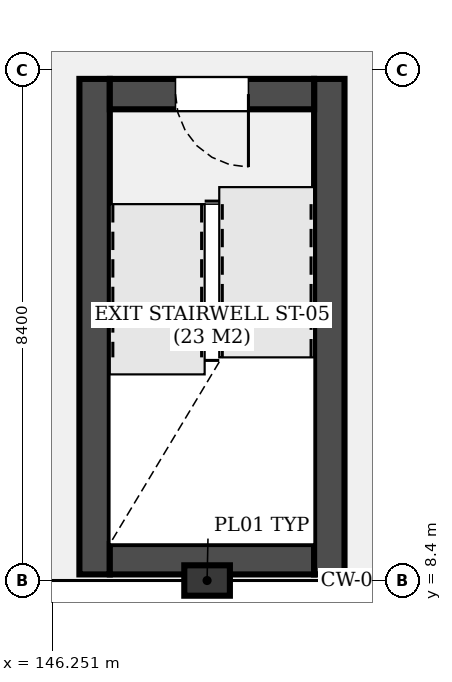
"""IFC4 building model, lengths in metres.
Left out: names, types, materials, properties, quantities, classifications, styles, units other than length and angle.
Written with IfcOpenShell. Run it as: python <this file> out.ifc"""

import sys

from ifc_helpers import new_model, si_unit, direction, frame, frame_2d, origin, origin_2d, place, context, subcontext, project, spatial, rectangle, extrude, element, fill, save


model = new_model("IFC4")
c1 = context("Model", 3, precision=1e-05, world=origin(), true_north=direction((0.0, 1.0)))
c2 = subcontext(c1, "Body", "Model", "MODEL_VIEW")
j1 = project(units=[si_unit("LENGTHUNIT", "METRE"), si_unit("PLANEANGLEUNIT", "RADIAN")], contexts=[c1])
p1 = place(None, origin())
s1 = spatial("IfcSite", under=j1, at=p1, CompositionType="ELEMENT")
p2 = place(p1, origin())
s2 = spatial("IfcBuilding", under=s1, at=p2, CompositionType="ELEMENT")
p3 = place(p2, frame((0.0, 0.0, 9.9)))
s3 = spatial("IfcBuildingStorey", under=s2, at=p3, CompositionType="ELEMENT", Elevation=9.9)
p4 = place(p3, frame((148.8, 8.4, 0.0), z_axis=(0.0, 0.0, 1.0), x_axis=(1.0, 0.0, 0.0)))
e1 = element("IfcColumn", 1, at=p4, inside=s3, PredefinedType="PILASTER", context=c2, shape_type="SweptSolid", body=[
    extrude(rectangle(XDim=0.75, YDim=0.5, at=origin_2d()), origin(), (0.0, 0.0, 1.0), 3.6),
])
p5 = place(p3, frame((146.95, 16.65, 0.0), z_axis=(0.0, 0.0, 1.0), x_axis=(0.0, -1.0, 0.0)))
e2 = element("IfcWall", 2, at=p5, inside=s3, PredefinedType="SHEAR", context=c2, shape_type="SweptSolid", body=[
    extrude(rectangle(XDim=8.15, YDim=0.5, at=frame_2d((4.075, 0.0))), origin(), (0.0, 0.0, 1.0), 3.6),
])
p6 = place(p3, frame((147.2, 8.75, 0.0), z_axis=(0.0, 0.0, 1.0), x_axis=(1.0, 0.0, 0.0)))
e3 = element("IfcWall", 3, at=p6, inside=s3, PredefinedType="SHEAR", context=c2, shape_type="SweptSolid", body=[
    extrude(rectangle(XDim=3.36, YDim=0.5, at=frame_2d((1.68, 0.0))), origin(), (0.0, 0.0, 1.0), 3.6),
])
p7 = place(p3, frame((150.81, 8.5, 0.0), z_axis=(0.0, 0.0, 1.0), x_axis=(0.0, 1.0, 0.0)))
e4 = element("IfcWall", 4, at=p7, inside=s3, PredefinedType="SHEAR", context=c2, shape_type="SweptSolid", body=[
    extrude(rectangle(XDim=8.15, YDim=0.5, at=frame_2d((4.075, 0.0))), origin(), (0.0, 0.0, 1.0), 3.6),
])
p8 = place(p3, frame((150.56, 16.4, 0.0), z_axis=(0.0, 0.0, 1.0), x_axis=(-1.0, 0.0, 0.0)))
e5 = element("IfcWall", 5, at=p8, inside=s3, PredefinedType="SHEAR", context=c2, shape_type="SweptSolid", body=[
    extrude(rectangle(XDim=3.36, YDim=0.5, at=frame_2d((1.68, 0.0))), origin(), (0.0, 0.0, 1.0), 3.6),
])
p9 = place(p8, frame((1.08, 0.0, 0.0)))
e6 = element("IfcOpeningElement", 6, at=p9, cuts=e5, PredefinedType="OPENING", context=c2, shape_type="SweptSolid", body=[
    extrude(rectangle(XDim=1.2, YDim=2.2, at=frame_2d((0.6, 1.1))), frame((0.0, 0.26, 0.0), z_axis=(0.0, -1.0, 0.0), x_axis=(1.0, 0.0, 0.0)), (0.0, 0.0, 1.0), 0.52),
])
p10 = place(p9, origin())
e7 = element("IfcDoor", 7, at=p10, inside=s3, OperationType="SINGLE_SWING_LEFT", PredefinedType="DOOR", context=c2, shape_type="SweptSolid", body=[
    extrude(rectangle(XDim=1.2, YDim=2.2, at=frame_2d((0.6, 1.1))), frame((0.0, 0.025, 0.0), z_axis=(0.0, -1.0, 0.0), x_axis=(1.0, 0.0, 0.0)), (0.0, 0.0, 1.0), 0.05),
])
fill(e6, e7)
save(model, sys.argv[1])
